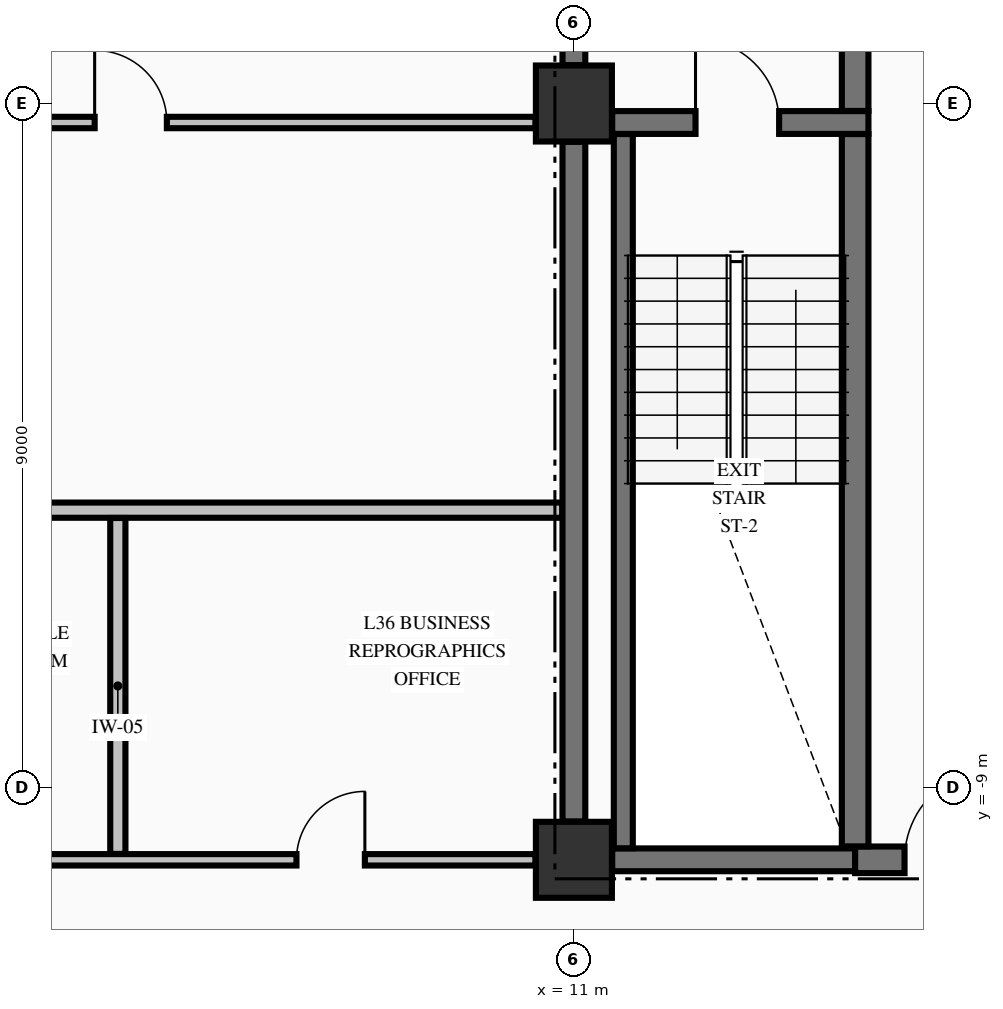
"""IFC4 building model, lengths in metres.
Left out: names, types, materials, properties, quantities, classifications, styles, units other than length and angle.
Written with IfcOpenShell. Run it as: python <this file> out.ifc"""

import sys

from ifc_helpers import new_model, si_unit, direction, frame, frame_2d, origin, origin_2d, place, context, subcontext, project, spatial, rectangle, extrude, element, fill, save


model = new_model("IFC4")
c1 = context("Model", 3, precision=1e-05, world=origin(), true_north=direction((0.0, 1.0)))
c2 = subcontext(c1, "Body", "Model", "MODEL_VIEW")
j1 = project(units=[si_unit("LENGTHUNIT", "METRE"), si_unit("PLANEANGLEUNIT", "RADIAN")], contexts=[c1])
p1 = place(None, origin())
s1 = spatial("IfcSite", under=j1, at=p1, CompositionType="ELEMENT")
p2 = place(p1, origin())
s2 = spatial("IfcBuilding", under=s1, at=p2, CompositionType="ELEMENT")
p3 = place(p2, frame((0.0, 0.0, 142.77)))
s3 = spatial("IfcBuildingStorey", under=s2, at=p3, CompositionType="ELEMENT", Elevation=142.77)
for number, where, z_axis, x_axis in (
    (1, (11.0, -9.95, -0.325), (0.0, 0.0, 1.0), (1.0, 0.0, 0.0)),
    (2, (11.0, 0.0, -0.325), (0.0, 0.0, 1.0), (1.0, 0.0, 0.0)),
):
    element("IfcColumn", number, at=place(p3, frame(where, z_axis=z_axis, x_axis=x_axis)), inside=s3, PredefinedType="COLUMN", context=c2, shape_type="SweptSolid", body=[
        extrude(rectangle(XDim=1.0, YDim=1.0, at=origin_2d()), origin(), (0.0, 0.0, 1.0), 3.645),
    ])
p4 = place(p3, frame((11.504, -9.95, 0.0), z_axis=(0.0, 0.0, 1.0), x_axis=(1.0, 0.0, 0.0)))
e3 = element("IfcWall", 3, at=p4, inside=s3, PredefinedType="SHEAR", context=c2, shape_type="SweptSolid", body=[
    extrude(rectangle(XDim=3.196, YDim=0.3, at=frame_2d((1.598, 0.0))), origin(), (0.0, 0.0, 1.0), 3.32),
])
p5 = place(p3, frame((14.7, -9.95, 0.0), z_axis=(0.0, 0.0, 1.0), x_axis=(1.0, 0.0, 0.0)))
e4 = element("IfcWall", 4, at=p5, inside=s3, PredefinedType="SHEAR", context=c2, shape_type="SweptSolid", body=[
    extrude(rectangle(XDim=4.796, YDim=0.35, at=frame_2d((2.398, 0.0))), origin(), (0.0, 0.0, 1.0), 3.32),
])
p6 = place(p5, frame((0.65, 0.0, 0.0)))
e5 = element("IfcOpeningElement", 5, at=p6, cuts=e4, PredefinedType="OPENING", context=c2, shape_type="SweptSolid", body=[
    extrude(rectangle(XDim=1.2, YDim=2.15, at=frame_2d((0.6, 1.075))), frame((0.0, 0.185, 0.0), z_axis=(0.0, -1.0, 0.0), x_axis=(1.0, 0.0, 0.0)), (0.0, 0.0, 1.0), 0.37),
])
p7 = place(p3, frame((11.504, -0.25, 0.0), z_axis=(0.0, 0.0, 1.0), x_axis=(1.0, 0.0, 0.0)))
e6 = element("IfcWall", 6, at=p7, inside=s3, PredefinedType="SHEAR", context=c2, shape_type="SweptSolid", body=[
    extrude(rectangle(XDim=3.371, YDim=0.3, at=frame_2d((1.686, 0.0))), origin(), (0.0, 0.0, 1.0), 3.32),
])
p8 = place(p7, frame((1.096, 0.0, 0.0)))
e7 = element("IfcOpeningElement", 7, at=p8, cuts=e6, PredefinedType="OPENING", context=c2, shape_type="SweptSolid", body=[
    extrude(rectangle(XDim=1.1, YDim=2.15, at=frame_2d((0.55, 1.075))), frame((0.0, 0.16, 0.0), z_axis=(0.0, -1.0, 0.0), x_axis=(1.0, 0.0, 0.0)), (0.0, 0.0, 1.0), 0.32),
])
p9 = place(p3, frame((-10.494, -9.95, 0.0), z_axis=(0.0, 0.0, 1.0), x_axis=(1.0, 0.0, 0.0)))
e8 = element("IfcWall", 8, at=p9, inside=s3, PredefinedType="PARTITIONING", context=c2, shape_type="SweptSolid", body=[
    extrude(rectangle(XDim=20.988, YDim=0.15, at=frame_2d((10.494, 0.0))), origin(), (0.0, 0.0, 1.0), 3.32),
])
p10 = place(p9, frame((8.194, 0.0, 0.0)))
e9 = element("IfcOpeningElement", 9, at=p10, cuts=e8, PredefinedType="OPENING", context=c2, shape_type="SweptSolid", body=[
    extrude(rectangle(XDim=1.1, YDim=2.15, at=frame_2d((0.55, 1.075))), frame((0.0, 0.085, 0.0), z_axis=(0.0, -1.0, 0.0), x_axis=(1.0, 0.0, 0.0)), (0.0, 0.0, 1.0), 0.17),
])
p11 = place(p9, frame((13.619, 0.0, 0.0)))
e10 = element("IfcOpeningElement", 10, at=p11, cuts=e8, PredefinedType="OPENING", context=c2, shape_type="SweptSolid", body=[
    extrude(rectangle(XDim=0.95, YDim=2.15, at=frame_2d((0.475, 1.075))), frame((0.0, 0.085, 0.0), z_axis=(0.0, -1.0, 0.0), x_axis=(1.0, 0.0, 0.0)), (0.0, 0.0, 1.0), 0.17),
])
p12 = place(p9, frame((17.844, 0.0, 0.0)))
e11 = element("IfcOpeningElement", 11, at=p12, cuts=e8, PredefinedType="OPENING", context=c2, shape_type="SweptSolid", body=[
    extrude(rectangle(XDim=0.9, YDim=2.15, at=frame_2d((0.45, 1.075))), frame((0.0, 0.085, 0.0), z_axis=(0.0, -1.0, 0.0), x_axis=(1.0, 0.0, 0.0)), (0.0, 0.0, 1.0), 0.17),
])
p13 = place(p3, frame((-0.725, -5.35, 0.0), z_axis=(0.0, 0.0, 1.0), x_axis=(1.0, 0.0, 0.0)))
e12 = element("IfcWall", 12, at=p13, inside=s3, PredefinedType="PARTITIONING", context=c2, shape_type="SweptSolid", body=[
    extrude(rectangle(XDim=11.572, YDim=0.2, at=frame_2d((5.786, 0.0))), origin(), (0.0, 0.0, 1.0), 3.32),
])
p14 = place(p3, frame((-10.494, -0.25, 0.0), z_axis=(0.0, 0.0, 1.0), x_axis=(1.0, 0.0, 0.0)))
e13 = element("IfcWall", 13, at=p14, inside=s3, PredefinedType="PARTITIONING", context=c2, shape_type="SweptSolid", body=[
    extrude(rectangle(XDim=20.988, YDim=0.15, at=frame_2d((10.494, 0.0))), origin(), (0.0, 0.0, 1.0), 3.32),
])
p15 = place(p14, frame((8.194, 0.0, 0.0)))
e14 = element("IfcOpeningElement", 14, at=p15, cuts=e13, PredefinedType="OPENING", context=c2, shape_type="SweptSolid", body=[
    extrude(rectangle(XDim=1.1, YDim=2.15, at=frame_2d((0.55, 1.075))), frame((0.0, 0.085, 0.0), z_axis=(0.0, -1.0, 0.0), x_axis=(1.0, 0.0, 0.0)), (0.0, 0.0, 1.0), 0.17),
])
p16 = place(p14, frame((3.049, 0.0, 0.0)))
e15 = element("IfcOpeningElement", 15, at=p16, cuts=e13, PredefinedType="OPENING", context=c2, shape_type="SweptSolid", body=[
    extrude(rectangle(XDim=1.05, YDim=2.15, at=frame_2d((0.525, 1.075))), frame((0.0, 0.085, 0.0), z_axis=(0.0, -1.0, 0.0), x_axis=(1.0, 0.0, 0.0)), (0.0, 0.0, 1.0), 0.17),
])
p17 = place(p14, frame((15.189, 0.0, 0.0)))
e16 = element("IfcOpeningElement", 16, at=p17, cuts=e13, PredefinedType="OPENING", context=c2, shape_type="SweptSolid", body=[
    extrude(rectangle(XDim=0.95, YDim=2.15, at=frame_2d((0.475, 1.075))), frame((0.0, 0.085, 0.0), z_axis=(0.0, -1.0, 0.0), x_axis=(1.0, 0.0, 0.0)), (0.0, 0.0, 1.0), 0.17),
])
p18 = place(p3, frame((11.0, -9.446, 0.0), z_axis=(0.0, 0.0, 1.0), x_axis=(0.0, 1.0, 0.0)))
e17 = element("IfcWall", 17, at=p18, inside=s3, PredefinedType="SHEAR", context=c2, shape_type="SweptSolid", body=[
    extrude(rectangle(XDim=8.942, YDim=0.3, at=frame_2d((4.471, 0.0))), origin(), (0.0, 0.0, 1.0), 3.32),
])
p19 = place(p3, frame((11.0, 0.504, 0.0), z_axis=(0.0, 0.0, 1.0), x_axis=(0.0, 1.0, 0.0)))
e18 = element("IfcWall", 18, at=p19, inside=s3, PredefinedType="SHEAR", context=c2, shape_type="SweptSolid", body=[
    extrude(rectangle(XDim=2.244, YDim=0.3, at=frame_2d((1.122, 0.0))), origin(), (0.0, 0.0, 1.0), 3.32),
])
p20 = place(p19, frame((0.596, 0.0, 0.0)))
e19 = element("IfcOpeningElement", 19, at=p20, cuts=e18, PredefinedType="OPENING", context=c2, shape_type="SweptSolid", body=[
    extrude(rectangle(XDim=1.1, YDim=2.15, at=frame_2d((0.55, 1.075))), frame((0.0, 0.16, 0.0), z_axis=(0.0, -1.0, 0.0), x_axis=(1.0, 0.0, 0.0)), (0.0, 0.0, 1.0), 0.32),
])
p21 = place(p3, frame((11.65, -9.798, 0.0), z_axis=(0.0, 0.0, 1.0), x_axis=(0.0, 1.0, 0.0)))
e20 = element("IfcWall", 20, at=p21, inside=s3, PredefinedType="SOLIDWALL", context=c2, shape_type="SweptSolid", body=[
    extrude(rectangle(XDim=9.396, YDim=0.25, at=frame_2d((4.698, 0.0))), origin(), (0.0, 0.0, 1.0), 3.32),
])
p22 = place(p3, frame((14.7, -9.773, 0.0), z_axis=(0.0, 0.0, 1.0), x_axis=(0.0, 1.0, 0.0)))
e21 = element("IfcWall", 21, at=p22, inside=s3, PredefinedType="SHEAR", context=c2, shape_type="SweptSolid", body=[
    extrude(rectangle(XDim=9.371, YDim=0.35, at=frame_2d((4.686, 0.0))), origin(), (0.0, 0.0, 1.0), 3.32),
])
p23 = place(p3, frame((14.7, -0.098, 0.0), z_axis=(0.0, 0.0, 1.0), x_axis=(0.0, 1.0, 0.0)))
e22 = element("IfcWall", 22, at=p23, inside=s3, PredefinedType="SHEAR", context=c2, shape_type="SweptSolid", body=[
    extrude(rectangle(XDim=2.846, YDim=0.35, at=frame_2d((1.423, 0.0))), origin(), (0.0, 0.0, 1.0), 3.32),
])
p24 = place(p3, frame((5.0, -9.872, 0.0), z_axis=(0.0, 0.0, 1.0), x_axis=(0.0, 1.0, 0.0)))
e23 = element("IfcWall", 23, at=p24, inside=s3, PredefinedType="PARTITIONING", context=c2, shape_type="SweptSolid", body=[
    extrude(rectangle(XDim=4.419, YDim=0.2, at=frame_2d((2.209, 0.0))), origin(), (0.0, 0.0, 1.0), 3.32),
])
p25 = place(p8, origin())
e24 = element("IfcDoor", 24, at=p25, inside=s3, OperationType="SINGLE_SWING_LEFT", PredefinedType="DOOR", context=c2, shape_type="SweptSolid", body=[
    extrude(rectangle(XDim=1.1, YDim=2.15, at=frame_2d((0.55, 1.075))), frame((0.0, 0.025, 0.0), z_axis=(0.0, -1.0, 0.0), x_axis=(1.0, 0.0, 0.0)), (0.0, 0.0, 1.0), 0.05),
])
fill(e7, e24)
p26 = place(p6, origin())
e25 = element("IfcDoor", 25, at=p26, inside=s3, OperationType="SINGLE_SWING_RIGHT", PredefinedType="DOOR", context=c2, shape_type="SweptSolid", body=[
    extrude(rectangle(XDim=1.2, YDim=2.15, at=frame_2d((0.6, 1.075))), frame((0.0, 0.025, 0.0), z_axis=(0.0, -1.0, 0.0), x_axis=(1.0, 0.0, 0.0)), (0.0, 0.0, 1.0), 0.05),
])
fill(e5, e25)
p27 = place(p17, origin())
e26 = element("IfcDoor", 26, at=p27, inside=s3, OperationType="SINGLE_SWING_LEFT", PredefinedType="DOOR", context=c2, shape_type="SweptSolid", body=[
    extrude(rectangle(XDim=0.95, YDim=2.15, at=frame_2d((0.475, 1.075))), frame((0.0, 0.025, 0.0), z_axis=(0.0, -1.0, 0.0), x_axis=(1.0, 0.0, 0.0)), (0.0, 0.0, 1.0), 0.05),
])
fill(e16, e26)
p28 = place(p12, origin())
e27 = element("IfcDoor", 27, at=p28, inside=s3, OperationType="SINGLE_SWING_RIGHT", PredefinedType="DOOR", context=c2, shape_type="SweptSolid", body=[
    extrude(rectangle(XDim=0.9, YDim=2.15, at=frame_2d((0.45, 1.075))), frame((0.0, 0.025, 0.0), z_axis=(0.0, -1.0, 0.0), x_axis=(1.0, 0.0, 0.0)), (0.0, 0.0, 1.0), 0.05),
])
fill(e11, e27)
save(model, sys.argv[1])
